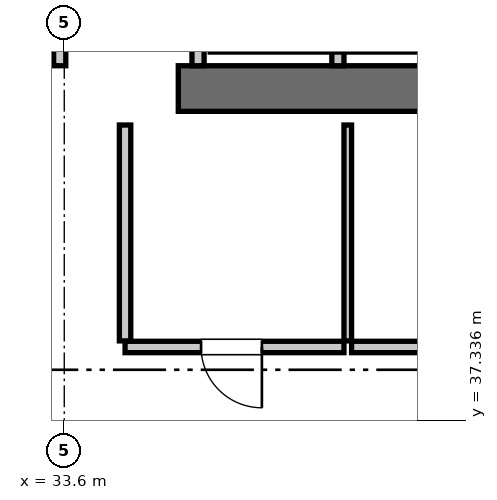
"""IFC4 building model, lengths in metres.
Left out: names, types, materials, properties, quantities, classifications, styles, units other than length and angle.
Written with IfcOpenShell. Run it as: python <this file> out.ifc"""

import sys

from ifc_helpers import new_model, si_unit, direction, frame, frame_2d, origin, place, context, subcontext, project, spatial, rectangle, extrude, element, fill, save


model = new_model("IFC4")
c1 = context("Model", 3, precision=1e-05, world=origin(), true_north=direction((0.0, 1.0)))
c2 = subcontext(c1, "Body", "Model", "MODEL_VIEW")
j1 = project(units=[si_unit("LENGTHUNIT", "METRE"), si_unit("PLANEANGLEUNIT", "RADIAN")], contexts=[c1])
p1 = place(None, origin())
s1 = spatial("IfcSite", under=j1, at=p1, CompositionType="ELEMENT")
p2 = place(p1, origin())
s2 = spatial("IfcBuilding", under=s1, at=p2, CompositionType="ELEMENT")
p3 = place(p2, frame((0.0, 0.0, 277.9)))
s3 = spatial("IfcBuildingStorey", under=s2, at=p3, CompositionType="ELEMENT", Elevation=277.9)
p4 = place(p3, frame((35.1, 41.7, 0.0), z_axis=(0.0, 0.0, 1.0), x_axis=(1.0, 0.0, 0.0)))
e1 = element("IfcWall", 1, at=p4, inside=s3, PredefinedType="SHEAR", context=c2, shape_type="SweptSolid", body=[
    extrude(rectangle(XDim=5.4, YDim=0.6, at=frame_2d((2.7, 0.0))), origin(), (0.0, 0.0, 1.0), 3.85),
])
p5 = place(p3, frame((37.2, 42.0, 0.0), z_axis=(0.0, 0.0, 1.0), x_axis=(0.0, 1.0, 0.0)))
e2 = element("IfcWall", 2, at=p5, inside=s3, PredefinedType="SOLIDWALL", context=c2, shape_type="SweptSolid", body=[
    extrude(rectangle(XDim=2.35, YDim=0.16, at=frame_2d((1.175, 0.0))), origin(), (0.0, 0.0, 1.0), 3.61),
])
for number, where, z_axis, x_axis in (
    (3, (33.54, 42.0, 0.0), (0.0, 0.0, 1.0), (0.0, 1.0, 0.0)),
    (4, (35.36, 42.0, 0.0), (0.0, 0.0, 1.0), (0.0, 1.0, 0.0)),
):
    element("IfcWall", number, at=place(p3, frame(where, z_axis=z_axis, x_axis=x_axis)), inside=s3, PredefinedType="SOLIDWALL", context=c2, shape_type="SweptSolid", body=[
        extrude(rectangle(XDim=2.4, YDim=0.16, at=frame_2d((1.2, 0.0))), origin(), (0.0, 0.0, 1.0), 3.61),
    ])
p6 = place(p3, frame((34.4, 38.3, 0.0), z_axis=(0.0, 0.0, 1.0), x_axis=(1.0, 0.0, 0.0)))
e5 = element("IfcWall", 5, at=p6, inside=s3, PredefinedType="PARTITIONING", context=c2, shape_type="SweptSolid", body=[
    extrude(rectangle(XDim=2.88, YDim=0.15, at=frame_2d((1.44, 0.0))), origin(), (0.0, 0.0, 1.0), 3.61),
])
p7 = place(p6, frame((1.0, 0.0, 0.0)))
e6 = element("IfcOpeningElement", 6, at=p7, cuts=e5, PredefinedType="OPENING", context=c2, shape_type="SweptSolid", body=[
    extrude(rectangle(XDim=0.8, YDim=2.05, at=frame_2d((0.4, 1.025))), frame((0.0, 0.085, 0.0), z_axis=(0.0, -1.0, 0.0), x_axis=(1.0, 0.0, 0.0)), (0.0, 0.0, 1.0), 0.17),
])
p8 = place(p3, frame((37.38, 38.3, 0.0), z_axis=(0.0, 0.0, 1.0), x_axis=(1.0, 0.0, 0.0)))
e7 = element("IfcWall", 7, at=p8, inside=s3, PredefinedType="PARTITIONING", context=c2, shape_type="SweptSolid", body=[
    extrude(rectangle(XDim=2.94, YDim=0.15, at=frame_2d((1.47, 0.0))), origin(), (0.0, 0.0, 1.0), 3.61),
])
p9 = place(p8, frame((1.0, 0.0, 0.0)))
e8 = element("IfcOpeningElement", 8, at=p9, cuts=e7, PredefinedType="OPENING", context=c2, shape_type="SweptSolid", body=[
    extrude(rectangle(XDim=0.8, YDim=2.05, at=frame_2d((0.4, 1.025))), frame((0.0, 0.085, 0.0), z_axis=(0.0, -1.0, 0.0), x_axis=(1.0, 0.0, 0.0)), (0.0, 0.0, 1.0), 0.17),
])
p10 = place(p3, frame((34.4, 38.38, 0.0), z_axis=(0.0, 0.0, 1.0), x_axis=(0.0, 1.0, 0.0)))
e9 = element("IfcWall", 9, at=p10, inside=s3, PredefinedType="PARTITIONING", context=c2, shape_type="SweptSolid", body=[
    extrude(rectangle(XDim=2.84, YDim=0.15, at=frame_2d((1.42, 0.0))), origin(), (0.0, 0.0, 1.0), 3.61),
])
p11 = place(p3, frame((37.33, 38.38, 0.0), z_axis=(0.0, 0.0, 1.0), x_axis=(0.0, 1.0, 0.0)))
e10 = element("IfcWall", 10, at=p11, inside=s3, PredefinedType="PARTITIONING", context=c2, shape_type="SweptSolid", body=[
    extrude(rectangle(XDim=2.84, YDim=0.1, at=frame_2d((1.42, 0.0))), origin(), (0.0, 0.0, 1.0), 3.61),
])
p12 = place(p7, frame((0.8, 0.0, 0.0), z_axis=(0.0, 0.0, 1.0), x_axis=(-1.0, 0.0, 0.0)))
e11 = element("IfcDoor", 11, at=p12, inside=s3, OperationType="SINGLE_SWING_LEFT", PredefinedType="DOOR", context=c2, shape_type="SweptSolid", body=[
    extrude(rectangle(XDim=0.8, YDim=2.05, at=frame_2d((0.4, 1.025))), frame((0.0, 0.025, 0.0), z_axis=(0.0, -1.0, 0.0), x_axis=(1.0, 0.0, 0.0)), (0.0, 0.0, 1.0), 0.05),
])
fill(e6, e11)
save(model, sys.argv[1])
